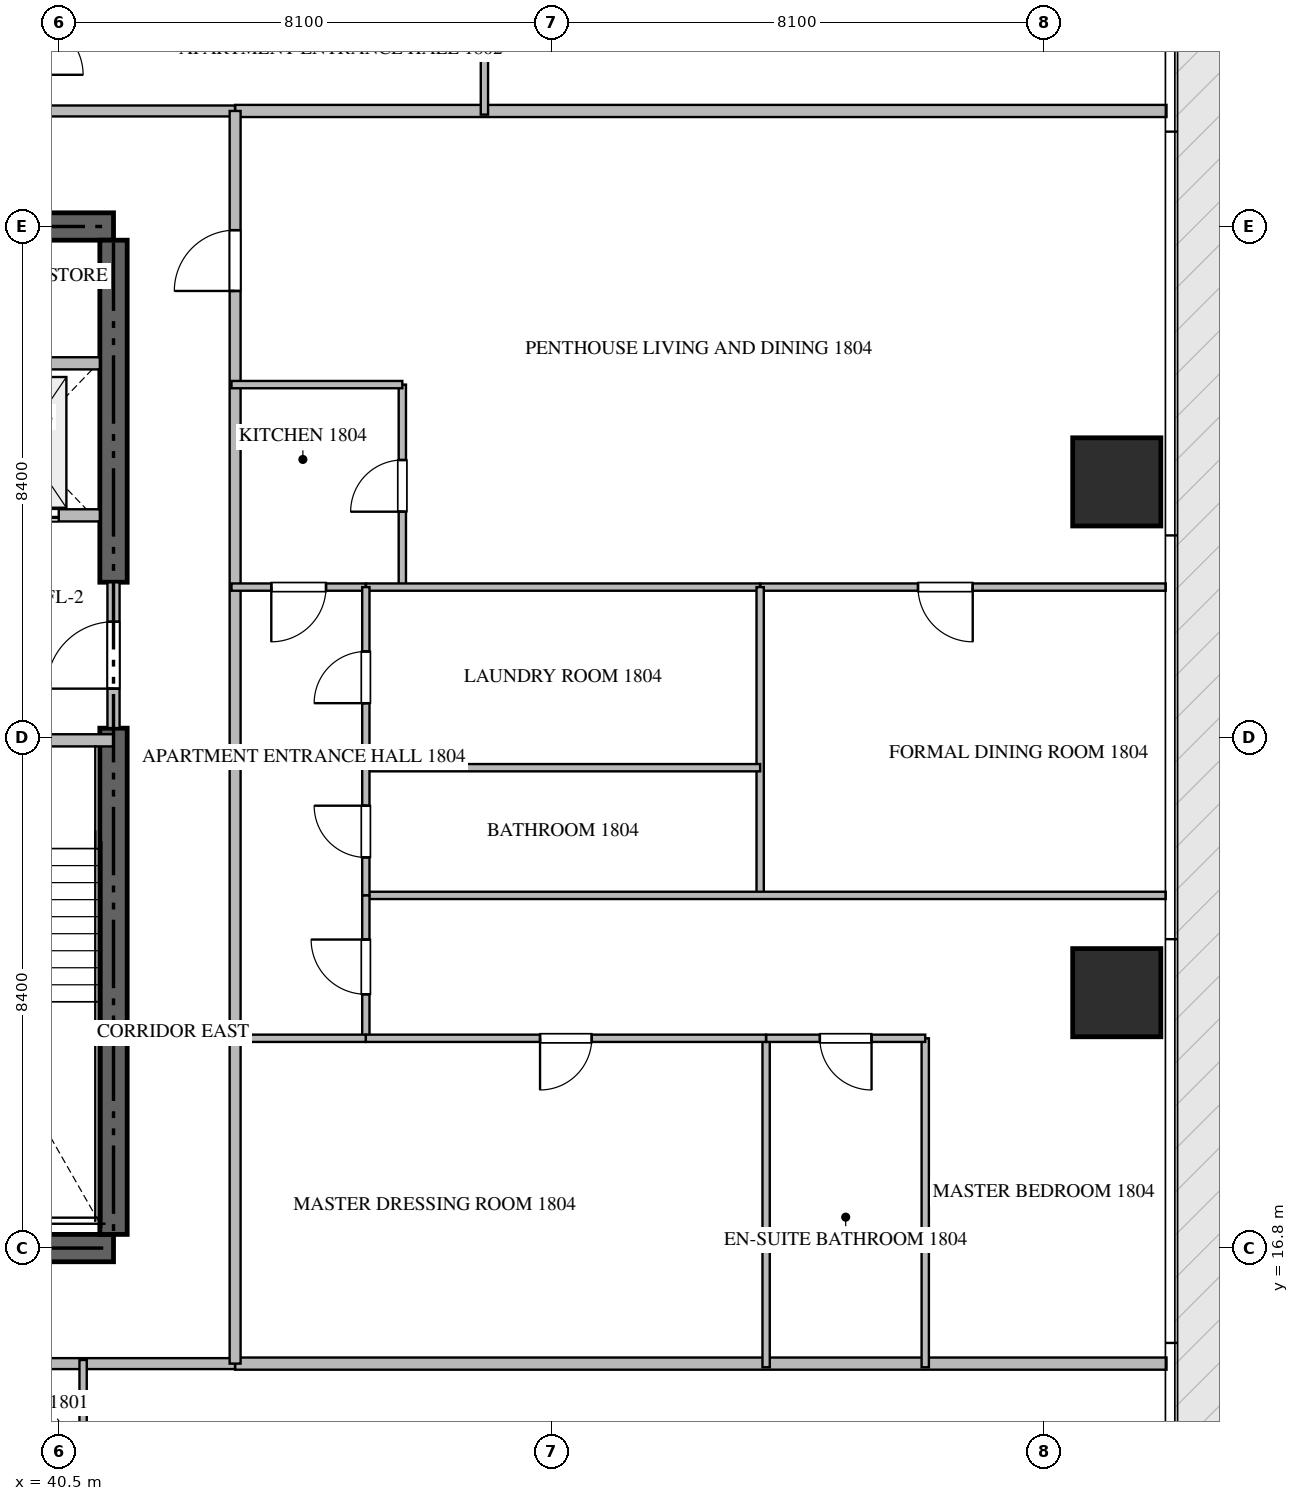
"""IFC4 building model, lengths in metres.
Left out: names, types, materials, properties, quantities, classifications, styles, units other than length and angle.
Written with IfcOpenShell. Run it as: python <this file> out.ifc"""

import sys

from ifc_helpers import new_model, si_unit, direction, frame, frame_2d, origin, origin_2d, place, context, subcontext, project, spatial, rectangle, extrude, source, transform, mapped, element, fill, save


model = new_model("IFC4")
c1 = context("Model", 3, precision=1e-05, world=origin(), true_north=direction((0.0, 1.0)))
c2 = subcontext(c1, "Body", "Model", "MODEL_VIEW")
j1 = project(units=[si_unit("LENGTHUNIT", "METRE"), si_unit("PLANEANGLEUNIT", "RADIAN")], contexts=[c1])
p1 = place(None, origin())
s1 = spatial("IfcSite", under=j1, at=p1, CompositionType="ELEMENT")
p2 = place(p1, origin())
s2 = spatial("IfcBuilding", under=s1, at=p2, CompositionType="ELEMENT")
p3 = place(p2, frame((0.0, 0.0, 75.45)))
s3 = spatial("IfcBuildingStorey", under=s2, at=p3, CompositionType="ELEMENT", Elevation=75.45)
for number, where, z_axis, x_axis in (
    (1, (23.4, 16.8, -0.26), (0.0, 0.0, 1.0), (1.0, 0.0, 0.0)),
    (2, (41.4, 33.6, -0.26), (0.0, 0.0, 1.0), (-1.0, 0.0, 0.0)),
):
    element("IfcWall", number, at=place(p3, frame(where, z_axis=z_axis, x_axis=x_axis)), inside=s3, PredefinedType="SHEAR", context=c2, shape_type="SweptSolid", body=[
        extrude(rectangle(XDim=18.0, YDim=0.45, at=frame_2d((9.0, 0.0))), origin(), (0.0, 0.0, 1.0), 3.748),
    ])
p4 = place(p3, frame((41.4, 17.025, -0.26), z_axis=(0.0, 0.0, 1.0), x_axis=(0.0, 1.0, 0.0)))
e3 = element("IfcWall", 3, at=p4, inside=s3, PredefinedType="SHEAR", context=c2, shape_type="SweptSolid", body=[
    extrude(rectangle(XDim=8.325, YDim=0.45, at=frame_2d((4.163, 0.0))), origin(), (0.0, 0.0, 1.0), 3.748),
])
p5 = place(p3, frame((41.4, 27.75, -0.26), z_axis=(0.0, 0.0, 1.0), x_axis=(0.0, 1.0, 0.0)))
e4 = element("IfcWall", 4, at=p5, inside=s3, PredefinedType="SHEAR", context=c2, shape_type="SweptSolid", body=[
    extrude(rectangle(XDim=5.625, YDim=0.45, at=frame_2d((2.812, 0.0))), origin(), (0.0, 0.0, 1.0), 3.748),
])
m1 = source(origin(), c2, "Body", "SweptSolid", [
    extrude(rectangle(XDim=1.45, YDim=1.45, at=origin_2d()), origin(), (0.0, 0.0, 1.0), 3.75),
])
for number, where, z_axis, x_axis in (
    (5, (57.9, 21.0, -0.26), (0.0, 0.0, 1.0), (1.0, 0.0, 0.0)),
    (6, (57.9, 29.4, -0.26), (0.0, 0.0, 1.0), (1.0, 0.0, 0.0)),
):
    element("IfcColumn", number, at=place(p3, frame(where, z_axis=z_axis, x_axis=x_axis)), inside=s3, PredefinedType="COLUMN", context=c2, shape_type="MappedRepresentation", body=[
        mapped(m1, transform((0.0, 0.0, 0.0), scale=1.0)),
    ])
p6 = place(p3, frame((36.95, 25.15, 0.0), z_axis=(0.0, 0.0, 1.0), x_axis=(1.0, 0.0, 0.0)))
e7 = element("IfcWall", 7, at=p6, inside=s3, PredefinedType="STANDARD", context=c2, shape_type="SweptSolid", body=[
    extrude(rectangle(XDim=4.45, YDim=0.2, at=frame_2d((2.225, 0.0))), origin(), (0.0, 0.0, 1.0), 3.49),
])
p7 = place(p6, frame((1.65, 0.0, 0.0)))
e8 = element("IfcOpeningElement", 8, at=p7, cuts=e7, PredefinedType="OPENING", context=c2, shape_type="SweptSolid", body=[
    extrude(rectangle(XDim=1.1, YDim=2.15, at=frame_2d((0.55, 1.075))), frame((0.0, 0.11, 0.0), z_axis=(0.0, -1.0, 0.0), x_axis=(1.0, 0.0, 0.0)), (0.0, 0.0, 1.0), 0.22),
])
p8 = place(p3, frame((38.75, 28.85, 0.0), z_axis=(0.0, 0.0, 1.0), x_axis=(1.0, 0.0, 0.0)))
e9 = element("IfcWall", 9, at=p8, inside=s3, PredefinedType="STANDARD", context=c2, shape_type="SweptSolid", body=[
    extrude(rectangle(XDim=2.425, YDim=0.2, at=frame_2d((1.212, 0.0))), origin(), (0.0, 0.0, 1.0), 3.49),
])
p9 = place(p8, frame((0.55, 0.0, 0.0)))
e10 = element("IfcOpeningElement", 10, at=p9, cuts=e9, PredefinedType="OPENING", context=c2, shape_type="SweptSolid", body=[
    extrude(rectangle(XDim=1.2, YDim=2.2, at=frame_2d((0.6, 1.1))), frame((0.0, 0.11, 0.0), z_axis=(0.0, -1.0, 0.0), x_axis=(1.0, 0.0, 0.0)), (0.0, 0.0, 1.0), 0.22),
])
p10 = place(p3, frame((38.75, 31.35, 0.0), z_axis=(0.0, 0.0, 1.0), x_axis=(1.0, 0.0, 0.0)))
e11 = element("IfcWall", 11, at=p10, inside=s3, PredefinedType="STANDARD", context=c2, shape_type="SweptSolid", body=[
    extrude(rectangle(XDim=2.425, YDim=0.2, at=frame_2d((1.212, 0.0))), origin(), (0.0, 0.0, 1.0), 3.49),
])
p11 = place(p3, frame((41.4, 25.352, 0.0), z_axis=(0.0, 0.0, 1.0), x_axis=(0.0, 1.0, 0.0)))
e12 = element("IfcWall", 12, at=p11, inside=s3, PredefinedType="STANDARD", context=c2, shape_type="SweptSolid", body=[
    extrude(rectangle(XDim=2.396, YDim=0.2, at=frame_2d((1.198, 0.0))), origin(), (0.0, 0.0, 1.0), 3.49),
])
p12 = place(p11, frame((0.648, 0.0, 0.0)))
e13 = element("IfcOpeningElement", 13, at=p12, cuts=e12, PredefinedType="OPENING", context=c2, shape_type="SweptSolid", body=[
    extrude(rectangle(XDim=1.1, YDim=2.15, at=frame_2d((0.55, 1.075))), frame((0.0, 0.11, 0.0), z_axis=(0.0, -1.0, 0.0), x_axis=(1.0, 0.0, 0.0)), (0.0, 0.0, 1.0), 0.22),
])
for number, where, z_axis, x_axis in (
    (14, (43.4, 14.9, 0.0), (0.0, 0.0, 1.0), (1.0, 0.0, 0.0)),
    (15, (43.4, 35.5, 0.0), (0.0, 0.0, 1.0), (1.0, 0.0, 0.0)),
):
    element("IfcWall", number, at=place(p3, frame(where, z_axis=z_axis, x_axis=x_axis)), inside=s3, PredefinedType="PARTITIONING", context=c2, shape_type="SweptSolid", body=[
        extrude(rectangle(XDim=15.318, YDim=0.2, at=frame_2d((7.659, 0.0))), origin(), (0.0, 0.0, 1.0), 3.49),
    ])
p13 = place(p3, frame((21.402, 14.9, 0.0), z_axis=(0.0, 0.0, 1.0), x_axis=(1.0, 0.0, 0.0)))
e16 = element("IfcWall", 16, at=p13, inside=s3, PredefinedType="PARTITIONING", context=c2, shape_type="SweptSolid", body=[
    extrude(rectangle(XDim=21.996, YDim=0.18, at=frame_2d((10.998, 0.0))), origin(), (0.0, 0.0, 1.0), 3.49),
])
p14 = place(p13, frame((7.202, 0.0, 0.0)))
e17 = element("IfcOpeningElement", 17, at=p14, cuts=e16, PredefinedType="OPENING", context=c2, shape_type="SweptSolid", body=[
    extrude(rectangle(XDim=1.0, YDim=2.15, at=frame_2d((0.5, 1.075))), frame((0.0, 0.1, 0.0), z_axis=(0.0, -1.0, 0.0), x_axis=(1.0, 0.0, 0.0)), (0.0, 0.0, 1.0), 0.2),
])
p15 = place(p3, frame((21.402, 35.5, 0.0), z_axis=(0.0, 0.0, 1.0), x_axis=(1.0, 0.0, 0.0)))
e18 = element("IfcWall", 18, at=p15, inside=s3, PredefinedType="PARTITIONING", context=c2, shape_type="SweptSolid", body=[
    extrude(rectangle(XDim=21.996, YDim=0.18, at=frame_2d((10.998, 0.0))), origin(), (0.0, 0.0, 1.0), 3.49),
])
p16 = place(p15, frame((15.222, 0.0, 0.0)))
e19 = element("IfcOpeningElement", 19, at=p16, cuts=e18, PredefinedType="OPENING", context=c2, shape_type="SweptSolid", body=[
    extrude(rectangle(XDim=1.0, YDim=2.15, at=frame_2d((0.5, 1.075))), frame((0.0, 0.1, 0.0), z_axis=(0.0, -1.0, 0.0), x_axis=(1.0, 0.0, 0.0)), (0.0, 0.0, 1.0), 0.2),
])
p17 = place(p3, frame((43.4, 14.9, 0.0), z_axis=(0.0, 0.0, 1.0), x_axis=(0.0, 1.0, 0.0)))
e20 = element("IfcWall", 20, at=p17, inside=s3, PredefinedType="PARTITIONING", context=c2, shape_type="SweptSolid", body=[
    extrude(rectangle(XDim=20.6, YDim=0.18, at=frame_2d((10.3, 0.0))), origin(), (0.0, 0.0, 1.0), 3.49),
])
p18 = place(p17, frame((17.64, 0.0, 0.0)))
e21 = element("IfcOpeningElement", 21, at=p18, cuts=e20, PredefinedType="OPENING", context=c2, shape_type="SweptSolid", body=[
    extrude(rectangle(XDim=1.0, YDim=2.15, at=frame_2d((0.5, 1.075))), frame((0.0, 0.1, 0.0), z_axis=(0.0, -1.0, 0.0), x_axis=(1.0, 0.0, 0.0)), (0.0, 0.0, 1.0), 0.2),
])
for number, where, z_axis, x_axis in (
    (22, (40.9, 12.752, 0.0), (0.0, 0.0, 1.0), (0.0, 1.0, 0.0)),
    (23, (47.5, 37.648, 0.0), (0.0, 0.0, 1.0), (0.0, -1.0, 0.0)),
):
    element("IfcWall", number, at=place(p3, frame(where, z_axis=z_axis, x_axis=x_axis)), inside=s3, PredefinedType="PARTITIONING", context=c2, shape_type="SweptSolid", body=[
        extrude(rectangle(XDim=2.208, YDim=0.12, at=frame_2d((1.104, 0.0))), origin(), (0.0, 0.0, 1.0), 3.49),
    ])
p19 = place(p3, frame((46.15, 27.67, 0.0), z_axis=(0.0, 0.0, 1.0), x_axis=(0.0, 1.0, 0.0)))
e24 = element("IfcWall", 24, at=p19, inside=s3, PredefinedType="PARTITIONING", context=c2, shape_type="SweptSolid", body=[
    extrude(rectangle(XDim=3.33, YDim=0.12, at=frame_2d((1.665, 0.0))), origin(), (0.0, 0.0, 1.0), 3.49),
])
p20 = place(p19, frame((1.24, 0.0, 0.0)))
e25 = element("IfcOpeningElement", 25, at=p20, cuts=e24, PredefinedType="OPENING", context=c2, shape_type="SweptSolid", body=[
    extrude(rectangle(XDim=0.85, YDim=2.1, at=frame_2d((0.425, 1.05))), frame((0.0, 0.07, 0.0), z_axis=(0.0, -1.0, 0.0), x_axis=(1.0, 0.0, 0.0)), (0.0, 0.0, 1.0), 0.14),
])
p21 = place(p3, frame((46.15, 31.0, 0.0), z_axis=(0.0, 0.0, 1.0), x_axis=(-1.0, 0.0, 0.0)))
e26 = element("IfcWall", 26, at=p21, inside=s3, PredefinedType="PARTITIONING", context=c2, shape_type="SweptSolid", body=[
    extrude(rectangle(XDim=2.81, YDim=0.12, at=frame_2d((1.405, 0.0))), origin(), (0.0, 0.0, 1.0), 3.49),
])
p22 = place(p3, frame((45.55, 27.67, 0.0), z_axis=(0.0, 0.0, 1.0), x_axis=(-1.0, 0.0, 0.0)))
e27 = element("IfcWall", 27, at=p22, inside=s3, PredefinedType="PARTITIONING", context=c2, shape_type="SweptSolid", body=[
    extrude(rectangle(XDim=2.21, YDim=0.12, at=frame_2d((1.105, 0.0))), origin(), (0.0, 0.0, 1.0), 3.49),
])
p23 = place(p22, frame((0.655, 0.0, 0.0)))
e28 = element("IfcOpeningElement", 28, at=p23, cuts=e27, PredefinedType="OPENING", context=c2, shape_type="SweptSolid", body=[
    extrude(rectangle(XDim=0.9, YDim=2.1, at=frame_2d((0.45, 1.05))), frame((0.0, 0.07, 0.0), z_axis=(0.0, -1.0, 0.0), x_axis=(1.0, 0.0, 0.0)), (0.0, 0.0, 1.0), 0.14),
])
p24 = place(p3, frame((58.705, 27.67, 0.0), z_axis=(0.0, 0.0, 1.0), x_axis=(-1.0, 0.0, 0.0)))
e29 = element("IfcWall", 29, at=p24, inside=s3, PredefinedType="PARTITIONING", context=c2, shape_type="SweptSolid", body=[
    extrude(rectangle(XDim=6.67, YDim=0.12, at=frame_2d((3.335, 0.0))), origin(), (0.0, 0.0, 1.0), 3.49),
])
p25 = place(p24, frame((3.174, 0.0, 0.0)))
e30 = element("IfcOpeningElement", 30, at=p25, cuts=e29, PredefinedType="OPENING", context=c2, shape_type="SweptSolid", body=[
    extrude(rectangle(XDim=0.9, YDim=2.1, at=frame_2d((0.45, 1.05))), frame((0.0, 0.07, 0.0), z_axis=(0.0, -1.0, 0.0), x_axis=(1.0, 0.0, 0.0)), (0.0, 0.0, 1.0), 0.14),
])
p26 = place(p3, frame((52.033, 27.67, 0.0), z_axis=(0.0, 0.0, 1.0), x_axis=(-1.0, 0.0, 0.0)))
e31 = element("IfcWall", 31, at=p26, inside=s3, PredefinedType="PARTITIONING", context=c2, shape_type="SweptSolid", body=[
    extrude(rectangle(XDim=6.481, YDim=0.12, at=frame_2d((3.24, 0.0))), origin(), (0.0, 0.0, 1.0), 3.49),
])
p27 = place(p3, frame((52.035, 22.6, 0.0), z_axis=(0.0, 0.0, 1.0), x_axis=(0.0, 1.0, 0.0)))
e32 = element("IfcWall", 32, at=p27, inside=s3, PredefinedType="PARTITIONING", context=c2, shape_type="SweptSolid", body=[
    extrude(rectangle(XDim=5.07, YDim=0.12, at=frame_2d((2.535, 0.0))), origin(), (0.0, 0.0, 1.0), 3.49),
])
p28 = place(p3, frame((58.705, 22.6, 0.0), z_axis=(0.0, 0.0, 1.0), x_axis=(-1.0, 0.0, 0.0)))
e33 = element("IfcWall", 33, at=p28, inside=s3, PredefinedType="PARTITIONING", context=c2, shape_type="SweptSolid", body=[
    extrude(rectangle(XDim=13.155, YDim=0.12, at=frame_2d((6.578, 0.0))), origin(), (0.0, 0.0, 1.0), 3.49),
])
p29 = place(p3, frame((52.035, 24.7, 0.0), z_axis=(0.0, 0.0, 1.0), x_axis=(-1.0, 0.0, 0.0)))
e34 = element("IfcWall", 34, at=p29, inside=s3, PredefinedType="PARTITIONING", context=c2, shape_type="SweptSolid", body=[
    extrude(rectangle(XDim=6.485, YDim=0.12, at=frame_2d((3.242, 0.0))), origin(), (0.0, 0.0, 1.0), 3.49),
])
p30 = place(p3, frame((45.55, 22.6, 0.0), z_axis=(0.0, 0.0, 1.0), x_axis=(0.0, 1.0, 0.0)))
e35 = element("IfcWall", 35, at=p30, inside=s3, PredefinedType="PARTITIONING", context=c2, shape_type="SweptSolid", body=[
    extrude(rectangle(XDim=2.1, YDim=0.12, at=frame_2d((1.05, 0.0))), origin(), (0.0, 0.0, 1.0), 3.49),
])
p31 = place(p30, frame((0.625, 0.0, 0.0)))
e36 = element("IfcOpeningElement", 36, at=p31, cuts=e35, PredefinedType="OPENING", context=c2, shape_type="SweptSolid", body=[
    extrude(rectangle(XDim=0.85, YDim=2.1, at=frame_2d((0.425, 1.05))), frame((0.0, 0.07, 0.0), z_axis=(0.0, -1.0, 0.0), x_axis=(1.0, 0.0, 0.0)), (0.0, 0.0, 1.0), 0.14),
])
p32 = place(p3, frame((45.55, 24.702, 0.0), z_axis=(0.0, 0.0, 1.0), x_axis=(0.0, 1.0, 0.0)))
e37 = element("IfcWall", 37, at=p32, inside=s3, PredefinedType="PARTITIONING", context=c2, shape_type="SweptSolid", body=[
    extrude(rectangle(XDim=2.968, YDim=0.12, at=frame_2d((1.484, 0.0))), origin(), (0.0, 0.0, 1.0), 3.49),
])
p33 = place(p32, frame((1.059, 0.0, 0.0)))
e38 = element("IfcOpeningElement", 38, at=p33, cuts=e37, PredefinedType="OPENING", context=c2, shape_type="SweptSolid", body=[
    extrude(rectangle(XDim=0.85, YDim=2.1, at=frame_2d((0.425, 1.05))), frame((0.0, 0.07, 0.0), z_axis=(0.0, -1.0, 0.0), x_axis=(1.0, 0.0, 0.0)), (0.0, 0.0, 1.0), 0.14),
])
p34 = place(p3, frame((45.55, 20.25, 0.0), z_axis=(0.0, 0.0, 1.0), x_axis=(0.0, 1.0, 0.0)))
e39 = element("IfcWall", 39, at=p34, inside=s3, PredefinedType="PARTITIONING", context=c2, shape_type="SweptSolid", body=[
    extrude(rectangle(XDim=2.348, YDim=0.12, at=frame_2d((1.174, 0.0))), origin(), (0.0, 0.0, 1.0), 3.49),
])
p35 = place(p34, frame((0.724, 0.0, 0.0)))
e40 = element("IfcOpeningElement", 40, at=p35, cuts=e39, PredefinedType="OPENING", context=c2, shape_type="SweptSolid", body=[
    extrude(rectangle(XDim=0.9, YDim=2.1, at=frame_2d((0.45, 1.05))), frame((0.0, 0.07, 0.0), z_axis=(0.0, -1.0, 0.0), x_axis=(1.0, 0.0, 0.0)), (0.0, 0.0, 1.0), 0.14),
])
for number, where, z_axis, x_axis in (
    (41, (54.75, 14.84, 0.0), (0.0, 0.0, 1.0), (0.0, 1.0, 0.0)),
    (42, (52.133, 14.84, 0.0), (0.0, 0.0, 1.0), (0.0, 1.0, 0.0)),
):
    element("IfcWall", number, at=place(p3, frame(where, z_axis=z_axis, x_axis=x_axis)), inside=s3, PredefinedType="PARTITIONING", context=c2, shape_type="SweptSolid", body=[
        extrude(rectangle(XDim=5.41, YDim=0.12, at=frame_2d((2.705, 0.0))), origin(), (0.0, 0.0, 1.0), 3.49),
    ])
p36 = place(p3, frame((54.75, 20.25, 0.0), z_axis=(0.0, 0.0, 1.0), x_axis=(-1.0, 0.0, 0.0)))
e43 = element("IfcWall", 43, at=p36, inside=s3, PredefinedType="PARTITIONING", context=c2, shape_type="SweptSolid", body=[
    extrude(rectangle(XDim=2.617, YDim=0.12, at=frame_2d((1.309, 0.0))), origin(), (0.0, 0.0, 1.0), 3.49),
])
p37 = place(p36, frame((0.883, 0.0, 0.0)))
e44 = element("IfcOpeningElement", 44, at=p37, cuts=e43, PredefinedType="OPENING", context=c2, shape_type="SweptSolid", body=[
    extrude(rectangle(XDim=0.85, YDim=2.1, at=frame_2d((0.425, 1.05))), frame((0.0, 0.07, 0.0), z_axis=(0.0, -1.0, 0.0), x_axis=(1.0, 0.0, 0.0)), (0.0, 0.0, 1.0), 0.14),
])
p38 = place(p3, frame((52.131, 20.25, 0.0), z_axis=(0.0, 0.0, 1.0), x_axis=(-1.0, 0.0, 0.0)))
e45 = element("IfcWall", 45, at=p38, inside=s3, PredefinedType="PARTITIONING", context=c2, shape_type="SweptSolid", body=[
    extrude(rectangle(XDim=6.581, YDim=0.12, at=frame_2d((3.291, 0.0))), origin(), (0.0, 0.0, 1.0), 3.49),
])
p39 = place(p38, frame((2.866, 0.0, 0.0)))
e46 = element("IfcOpeningElement", 46, at=p39, cuts=e45, PredefinedType="OPENING", context=c2, shape_type="SweptSolid", body=[
    extrude(rectangle(XDim=0.85, YDim=2.1, at=frame_2d((0.425, 1.05))), frame((0.0, 0.07, 0.0), z_axis=(0.0, -1.0, 0.0), x_axis=(1.0, 0.0, 0.0)), (0.0, 0.0, 1.0), 0.14),
])
p40 = place(p3, frame((45.548, 20.25, 0.0), z_axis=(0.0, 0.0, 1.0), x_axis=(-1.0, 0.0, 0.0)))
e47 = element("IfcWall", 47, at=p40, inside=s3, PredefinedType="PARTITIONING", context=c2, shape_type="SweptSolid", body=[
    extrude(rectangle(XDim=2.208, YDim=0.12, at=frame_2d((1.104, 0.0))), origin(), (0.0, 0.0, 1.0), 3.49),
])
m2 = source(origin(), c2, "Body", "SweptSolid", [
    extrude(rectangle(XDim=1.2, YDim=2.2, at=frame_2d((0.6, 1.1))), frame((0.0, 0.025, 0.0), z_axis=(0.0, -1.0, 0.0), x_axis=(1.0, 0.0, 0.0)), (0.0, 0.0, 1.0), 0.05),
])
p41 = place(p9, origin())
e48 = element("IfcDoor", 48, at=p41, inside=s3, OperationType="DOUBLE_DOOR_SLIDING", PredefinedType="DOOR", context=c2, shape_type="MappedRepresentation", body=[
    mapped(m2, transform((0.0, 0.0, 0.0), scale=1.0)),
])
fill(e10, e48)
m3 = source(origin(), c2, "Body", "SweptSolid", [
    extrude(rectangle(XDim=1.1, YDim=2.15, at=frame_2d((0.55, 1.075))), frame((0.0, 0.025, 0.0), z_axis=(0.0, -1.0, 0.0), x_axis=(1.0, 0.0, 0.0)), (0.0, 0.0, 1.0), 0.05),
])
p42 = place(p12, origin())
e49 = element("IfcDoor", 49, at=p42, inside=s3, OperationType="SINGLE_SWING_LEFT", PredefinedType="DOOR", context=c2, shape_type="MappedRepresentation", body=[
    mapped(m3, transform((0.0, 0.0, 0.0), scale=1.0)),
])
fill(e13, e49)
m4 = source(origin(), c2, "Body", "SweptSolid", [
    extrude(rectangle(XDim=1.0, YDim=2.15, at=frame_2d((0.5, 1.075))), frame((0.0, 0.025, 0.0), z_axis=(0.0, -1.0, 0.0), x_axis=(1.0, 0.0, 0.0)), (0.0, 0.0, 1.0), 0.05),
])
p43 = place(p18, origin())
e50 = element("IfcDoor", 50, at=p43, inside=s3, OperationType="SINGLE_SWING_LEFT", PredefinedType="DOOR", context=c2, shape_type="MappedRepresentation", body=[
    mapped(m4, transform((0.0, 0.0, 0.0), scale=1.0)),
])
fill(e21, e50)
m5 = source(origin(), c2, "Body", "SweptSolid", [
    extrude(rectangle(XDim=0.85, YDim=2.1, at=frame_2d((0.425, 1.05))), frame((0.0, 0.025, 0.0), z_axis=(0.0, -1.0, 0.0), x_axis=(1.0, 0.0, 0.0)), (0.0, 0.0, 1.0), 0.05),
])
p44 = place(p20, origin())
e51 = element("IfcDoor", 51, at=p44, inside=s3, OperationType="SINGLE_SWING_LEFT", PredefinedType="DOOR", context=c2, shape_type="MappedRepresentation", body=[
    mapped(m5, transform((0.0, 0.0, 0.0), scale=1.0)),
])
fill(e25, e51)
m6 = source(origin(), c2, "Body", "SweptSolid", [
    extrude(rectangle(XDim=0.9, YDim=2.1, at=frame_2d((0.45, 1.05))), frame((0.0, 0.025, 0.0), z_axis=(0.0, -1.0, 0.0), x_axis=(1.0, 0.0, 0.0)), (0.0, 0.0, 1.0), 0.05),
])
p45 = place(p23, origin())
e52 = element("IfcDoor", 52, at=p45, inside=s3, OperationType="SINGLE_SWING_RIGHT", PredefinedType="DOOR", context=c2, shape_type="MappedRepresentation", body=[
    mapped(m6, transform((0.0, 0.0, 0.0), scale=1.0)),
])
fill(e28, e52)
p46 = place(p25, origin())
e53 = element("IfcDoor", 53, at=p46, inside=s3, OperationType="SINGLE_SWING_LEFT", PredefinedType="DOOR", context=c2, shape_type="MappedRepresentation", body=[
    mapped(m6, transform((0.0, 0.0, 0.0), scale=1.0)),
])
fill(e30, e53)
p47 = place(p31, origin())
e54 = element("IfcDoor", 54, at=p47, inside=s3, OperationType="SINGLE_SWING_RIGHT", PredefinedType="DOOR", context=c2, shape_type="MappedRepresentation", body=[
    mapped(m5, transform((0.0, 0.0, 0.0), scale=1.0)),
])
fill(e36, e54)
p48 = place(p33, origin())
e55 = element("IfcDoor", 55, at=p48, inside=s3, OperationType="SINGLE_SWING_LEFT", PredefinedType="DOOR", context=c2, shape_type="MappedRepresentation", body=[
    mapped(m5, transform((0.0, 0.0, 0.0), scale=1.0)),
])
fill(e38, e55)
p49 = place(p35, origin())
e56 = element("IfcDoor", 56, at=p49, inside=s3, OperationType="SINGLE_SWING_RIGHT", PredefinedType="DOOR", context=c2, shape_type="MappedRepresentation", body=[
    mapped(m6, transform((0.0, 0.0, 0.0), scale=1.0)),
])
fill(e40, e56)
p50 = place(p37, origin())
e57 = element("IfcDoor", 57, at=p50, inside=s3, OperationType="SINGLE_SWING_LEFT", PredefinedType="DOOR", context=c2, shape_type="MappedRepresentation", body=[
    mapped(m5, transform((0.0, 0.0, 0.0), scale=1.0)),
])
fill(e44, e57)
p51 = place(p39, origin())
e58 = element("IfcDoor", 58, at=p51, inside=s3, OperationType="SINGLE_SWING_RIGHT", PredefinedType="DOOR", context=c2, shape_type="MappedRepresentation", body=[
    mapped(m5, transform((0.0, 0.0, 0.0), scale=1.0)),
])
fill(e46, e58)
save(model, sys.argv[1])
